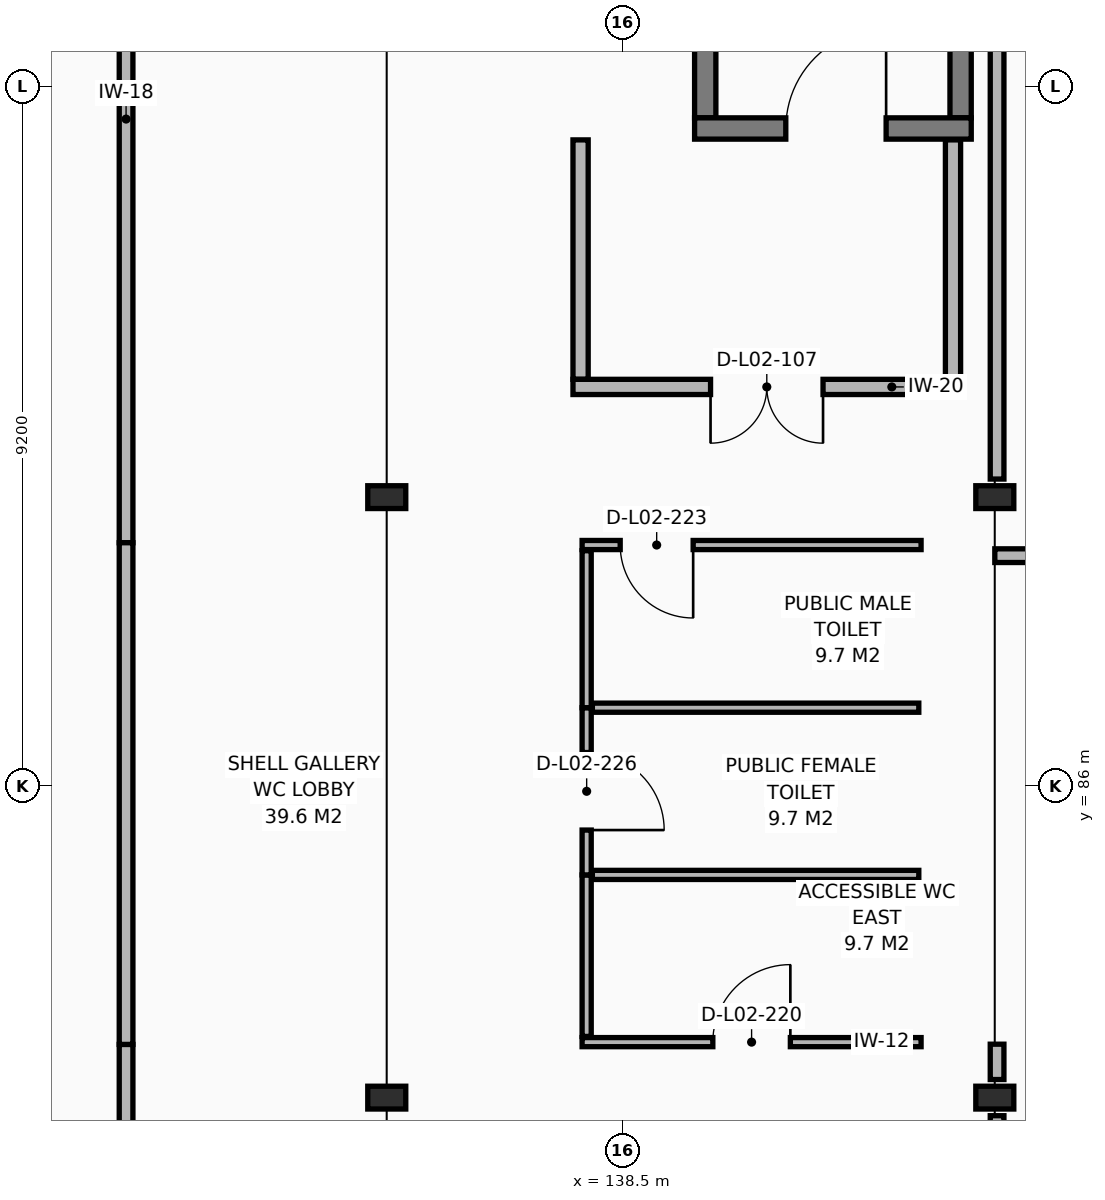
"""IFC4 building model, lengths in metres.
Left out: names, types, materials, properties, quantities, classifications, styles, units other than length and angle.
Written with IfcOpenShell. Run it as: python <this file> out.ifc"""

import sys

from ifc_helpers import new_model, si_unit, direction, frame, frame_2d, origin, origin_2d, place, context, subcontext, project, spatial, rectangle, i_section, extrude, element, fill, save


model = new_model("IFC4")
c1 = context("Model", 3, precision=1e-05, world=origin(), true_north=direction((0.0, 1.0)))
c2 = subcontext(c1, "Body", "Model", "MODEL_VIEW")
j1 = project(units=[si_unit("LENGTHUNIT", "METRE"), si_unit("PLANEANGLEUNIT", "RADIAN")], contexts=[c1])
p1 = place(None, origin())
s1 = spatial("IfcSite", under=j1, at=p1, CompositionType="ELEMENT")
p2 = place(p1, origin())
s2 = spatial("IfcBuilding", under=s1, at=p2, CompositionType="ELEMENT")
p3 = place(p2, frame((0.0, 0.0, 9.52)))
s3 = spatial("IfcBuildingStorey", under=s2, at=p3, CompositionType="ELEMENT", Elevation=9.52)
for number, where, z_axis, x_axis in (
    (1, (135.4, 81.9, 0.0), (0.0, 0.0, 1.0), (1.0, 0.0, 0.0)),
    (2, (135.4, 89.8, 0.0), (0.0, 0.0, 1.0), (1.0, 0.0, 0.0)),
):
    element("IfcColumn", number, at=place(p3, frame(where, z_axis=z_axis, x_axis=x_axis)), inside=s3, PredefinedType="COLUMN", context=c2, shape_type="SweptSolid", body=[
        extrude(i_section(OverallWidth=0.3, OverallDepth=0.5, WebThickness=0.014, FlangeThickness=0.028, FilletRadius=0.027, at=origin_2d()), origin(), (0.0, 0.0, 1.0), 7.65),
    ])
for number, where, z_axis, x_axis in (
    (3, (143.4, 81.9, 0.0), (0.0, 0.0, 1.0), (1.0, 0.0, 0.0)),
    (4, (143.4, 89.8, 0.0), (0.0, 0.0, 1.0), (1.0, 0.0, 0.0)),
):
    element("IfcColumn", number, at=place(p3, frame(where, z_axis=z_axis, x_axis=x_axis)), inside=s3, PredefinedType="COLUMN", context=c2, shape_type="SweptSolid", body=[
        extrude(i_section(OverallWidth=0.3, OverallDepth=0.5, WebThickness=0.014, FlangeThickness=0.028, FilletRadius=0.027, at=origin_2d()), origin(), (0.0, 0.0, 1.0), 9.05),
    ])
for number, where, z_axis, x_axis in (
    (5, (142.95, 94.79, 0.0), (0.0, 0.0, 1.0), (0.0, 1.0, 0.0)),
    (6, (139.59, 102.49, 0.0), (0.0, 0.0, 1.0), (0.0, -1.0, 0.0)),
):
    element("IfcWall", number, at=place(p3, frame(where, z_axis=z_axis, x_axis=x_axis)), inside=s3, PredefinedType="SHEAR", context=c2, shape_type="SweptSolid", body=[
        extrude(rectangle(XDim=7.7, YDim=0.28, at=frame_2d((3.85, 0.0))), origin(), (0.0, 0.0, 1.0), 4.0),
    ])
p4 = place(p3, frame((139.45, 94.65, 0.0), z_axis=(0.0, 0.0, 1.0), x_axis=(1.0, 0.0, 0.0)))
e7 = element("IfcWall", 7, at=p4, inside=s3, PredefinedType="SHEAR", context=c2, shape_type="SweptSolid", body=[
    extrude(rectangle(XDim=3.64, YDim=0.28, at=frame_2d((1.82, 0.0))), origin(), (0.0, 0.0, 1.0), 4.0),
])
p5 = place(p4, frame((1.2, 0.0, 0.0)))
e8 = element("IfcOpeningElement", 8, at=p5, cuts=e7, PredefinedType="OPENING", context=c2, shape_type="SweptSolid", body=[
    extrude(rectangle(XDim=1.32, YDim=2.12, at=frame_2d((0.66, 1.06))), frame((0.0, 0.15, 0.0), z_axis=(0.0, -1.0, 0.0), x_axis=(1.0, 0.0, 0.0)), (0.0, 0.0, 1.0), 0.3),
])
for number, where, z_axis, x_axis in (
    (9, (142.85, 91.35, 0.0), (0.0, 0.0, 1.0), (0.0, 1.0, 0.0)),
    (10, (137.95, 94.5, 0.0), (0.0, 0.0, 1.0), (0.0, -1.0, 0.0)),
):
    element("IfcWall", number, at=place(p3, frame(where, z_axis=z_axis, x_axis=x_axis)), inside=s3, PredefinedType="PARTITIONING", context=c2, shape_type="SweptSolid", body=[
        extrude(rectangle(XDim=3.15, YDim=0.2, at=frame_2d((1.575, 0.0))), origin(), (0.0, 0.0, 1.0), 4.0),
    ])
p6 = place(p3, frame((142.95, 91.25, 0.0), z_axis=(0.0, 0.0, 1.0), x_axis=(-1.0, 0.0, 0.0)))
e11 = element("IfcWall", 11, at=p6, inside=s3, PredefinedType="PARTITIONING", context=c2, shape_type="SweptSolid", body=[
    extrude(rectangle(XDim=5.1, YDim=0.2, at=frame_2d((2.55, 0.0))), origin(), (0.0, 0.0, 1.0), 4.0),
])
p7 = place(p6, frame((1.81, 0.0, 0.0)))
e12 = element("IfcOpeningElement", 12, at=p7, cuts=e11, PredefinedType="OPENING", context=c2, shape_type="SweptSolid", body=[
    extrude(rectangle(XDim=1.48, YDim=2.15, at=frame_2d((0.74, 1.075))), frame((0.0, 0.11, 0.0), z_axis=(0.0, -1.0, 0.0), x_axis=(1.0, 0.0, 0.0)), (0.0, 0.0, 1.0), 0.22),
])
p8 = place(p3, frame((137.97, 82.63, 0.0), z_axis=(0.0, 0.0, 1.0), x_axis=(1.0, 0.0, 0.0)))
e13 = element("IfcWall", 13, at=p8, inside=s3, PredefinedType="PARTITIONING", context=c2, shape_type="SweptSolid", body=[
    extrude(rectangle(XDim=4.46, YDim=0.12, at=frame_2d((2.23, 0.0))), origin(), (0.0, 0.0, 1.0), 3.99),
])
p9 = place(p8, frame((1.72, 0.0, 0.0)))
e14 = element("IfcOpeningElement", 14, at=p9, cuts=e13, PredefinedType="OPENING", context=c2, shape_type="SweptSolid", body=[
    extrude(rectangle(XDim=1.02, YDim=2.12, at=frame_2d((0.51, 1.06))), frame((0.0, 0.07, 0.0), z_axis=(0.0, -1.0, 0.0), x_axis=(1.0, 0.0, 0.0)), (0.0, 0.0, 1.0), 0.14),
])
p10 = place(p3, frame((131.97, 78.17, 0.0), z_axis=(0.0, 0.0, 1.0), x_axis=(0.0, 1.0, 0.0)))
e15 = element("IfcWall", 15, at=p10, inside=s3, PredefinedType="PARTITIONING", context=c2, shape_type="SweptSolid", body=[
    extrude(rectangle(XDim=4.43, YDim=0.18, at=frame_2d((2.215, 0.0))), origin(), (0.0, 0.0, 1.0), 3.99),
])
p11 = place(p10, frame((1.505, 0.0, 0.0)))
e16 = element("IfcOpeningElement", 16, at=p11, cuts=e15, PredefinedType="OPENING", context=c2, shape_type="SweptSolid", body=[
    extrude(rectangle(XDim=1.42, YDim=2.18, at=frame_2d((0.71, 1.09))), frame((0.0, 0.1, 0.0), z_axis=(0.0, -1.0, 0.0), x_axis=(1.0, 0.0, 0.0)), (0.0, 0.0, 1.0), 0.2),
])
p12 = place(p3, frame((143.43, 81.662, 0.0), z_axis=(0.0, 0.0, 1.0), x_axis=(0.0, -1.0, 0.0)))
e17 = element("IfcWall", 17, at=p12, inside=s3, PredefinedType="PARTITIONING", context=c2, shape_type="SweptSolid", body=[
    extrude(rectangle(XDim=3.862, YDim=0.18, at=frame_2d((1.931, 0.0))), origin(), (0.0, 0.0, 1.0), 3.99),
])
p13 = place(p12, frame((1.111, 0.0, 0.0)))
e18 = element("IfcOpeningElement", 18, at=p13, cuts=e17, PredefinedType="OPENING", context=c2, shape_type="SweptSolid", body=[
    extrude(rectangle(XDim=1.64, YDim=2.2, at=frame_2d((0.82, 1.1))), frame((0.0, 0.1, 0.0), z_axis=(0.0, -1.0, 0.0), x_axis=(1.0, 0.0, 0.0)), (0.0, 0.0, 1.0), 0.2),
])
p14 = place(p3, frame((143.43, 82.603, 0.0), z_axis=(0.0, 0.0, 1.0), x_axis=(0.0, -1.0, 0.0)))
e19 = element("IfcWall", 19, at=p14, inside=s3, PredefinedType="PARTITIONING", context=c2, shape_type="SweptSolid", body=[
    extrude(rectangle(XDim=0.465, YDim=0.18, at=frame_2d((0.232, 0.0))), origin(), (0.0, 0.0, 1.0), 3.99),
])
p15 = place(p3, frame((142.43, 89.17, 0.0), z_axis=(0.0, 0.0, 1.0), x_axis=(-1.0, 0.0, 0.0)))
e20 = element("IfcWall", 20, at=p15, inside=s3, PredefinedType="PARTITIONING", context=c2, shape_type="SweptSolid", body=[
    extrude(rectangle(XDim=4.46, YDim=0.12, at=frame_2d((2.23, 0.0))), origin(), (0.0, 0.0, 1.0), 3.99),
])
p16 = place(p15, frame((2.999, 0.0, 0.0)))
e21 = element("IfcOpeningElement", 21, at=p16, cuts=e20, PredefinedType="OPENING", context=c2, shape_type="SweptSolid", body=[
    extrude(rectangle(XDim=0.96, YDim=2.1, at=frame_2d((0.48, 1.05))), frame((0.0, 0.07, 0.0), z_axis=(0.0, -1.0, 0.0), x_axis=(1.0, 0.0, 0.0)), (0.0, 0.0, 1.0), 0.14),
])
p17 = place(p3, frame((131.97, 89.2, 0.0), z_axis=(0.0, 0.0, 1.0), x_axis=(0.0, 1.0, 0.0)))
e22 = element("IfcWall", 22, at=p17, inside=s3, PredefinedType="PARTITIONING", context=c2, shape_type="SweptSolid", body=[
    extrude(rectangle(XDim=23.936, YDim=0.18, at=frame_2d((11.968, 0.0))), origin(), (0.0, 0.0, 1.0), 3.99),
])
p18 = place(p17, frame((11.148, 0.0, 0.0)))
e23 = element("IfcOpeningElement", 23, at=p18, cuts=e22, PredefinedType="OPENING", context=c2, shape_type="SweptSolid", body=[
    extrude(rectangle(XDim=1.64, YDim=2.2, at=frame_2d((0.82, 1.1))), frame((0.0, 0.1, 0.0), z_axis=(0.0, -1.0, 0.0), x_axis=(1.0, 0.0, 0.0)), (0.0, 0.0, 1.0), 0.2),
])
p19 = place(p3, frame((143.43, 97.462, 0.0), z_axis=(0.0, 0.0, 1.0), x_axis=(0.0, -1.0, 0.0)))
e24 = element("IfcWall", 24, at=p19, inside=s3, PredefinedType="PARTITIONING", context=c2, shape_type="SweptSolid", body=[
    extrude(rectangle(XDim=7.424, YDim=0.18, at=frame_2d((3.712, 0.0))), origin(), (0.0, 0.0, 1.0), 3.99),
])
p20 = place(p3, frame((138.03, 84.83, 0.0), z_axis=(0.0, 0.0, 1.0), x_axis=(0.0, -1.0, 0.0)))
e25 = element("IfcWall", 25, at=p20, inside=s3, PredefinedType="PARTITIONING", context=c2, shape_type="SweptSolid", body=[
    extrude(rectangle(XDim=2.125, YDim=0.12, at=frame_2d((1.062, 0.0))), origin(), (0.0, 0.0, 1.0), 3.99),
])
p21 = place(p3, frame((138.03, 87.03, 0.0), z_axis=(0.0, 0.0, 1.0), x_axis=(0.0, -1.0, 0.0)))
e26 = element("IfcWall", 26, at=p21, inside=s3, PredefinedType="PARTITIONING", context=c2, shape_type="SweptSolid", body=[
    extrude(rectangle(XDim=2.2, YDim=0.12, at=frame_2d((1.1, 0.0))), origin(), (0.0, 0.0, 1.0), 3.99),
])
p22 = place(p21, frame((0.59, 0.0, 0.0)))
e27 = element("IfcOpeningElement", 27, at=p22, cuts=e26, PredefinedType="OPENING", context=c2, shape_type="SweptSolid", body=[
    extrude(rectangle(XDim=1.02, YDim=2.12, at=frame_2d((0.51, 1.06))), frame((0.0, 0.07, 0.0), z_axis=(0.0, -1.0, 0.0), x_axis=(1.0, 0.0, 0.0)), (0.0, 0.0, 1.0), 0.14),
])
p23 = place(p3, frame((138.03, 89.095, 0.0), z_axis=(0.0, 0.0, 1.0), x_axis=(0.0, -1.0, 0.0)))
e28 = element("IfcWall", 28, at=p23, inside=s3, PredefinedType="PARTITIONING", context=c2, shape_type="SweptSolid", body=[
    extrude(rectangle(XDim=2.065, YDim=0.12, at=frame_2d((1.032, 0.0))), origin(), (0.0, 0.0, 1.0), 3.99),
])
p24 = place(p3, frame((131.97, 82.6, 0.0), z_axis=(0.0, 0.0, 1.0), x_axis=(0.0, 1.0, 0.0)))
e29 = element("IfcWall", 29, at=p24, inside=s3, PredefinedType="PARTITIONING", context=c2, shape_type="SweptSolid", body=[
    extrude(rectangle(XDim=6.6, YDim=0.18, at=frame_2d((3.3, 0.0))), origin(), (0.0, 0.0, 1.0), 3.99),
])
for number, where, z_axis, x_axis in (
    (30, (138.105, 84.83, 0.0), (0.0, 0.0, 1.0), (1.0, 0.0, 0.0)),
    (31, (138.105, 87.03, 0.0), (0.0, 0.0, 1.0), (1.0, 0.0, 0.0)),
):
    element("IfcWall", number, at=place(p3, frame(where, z_axis=z_axis, x_axis=x_axis)), inside=s3, PredefinedType="PARTITIONING", context=c2, shape_type="SweptSolid", body=[
        extrude(rectangle(XDim=4.295, YDim=0.12, at=frame_2d((2.147, 0.0))), origin(), (0.0, 0.0, 1.0), 3.99),
    ])
p25 = place(p3, frame((143.4, 89.03, 0.0), z_axis=(0.0, 0.0, 1.0), x_axis=(1.0, 0.0, 0.0)))
e32 = element("IfcWall", 32, at=p25, inside=s3, PredefinedType="PARTITIONING", context=c2, shape_type="SweptSolid", body=[
    extrude(rectangle(XDim=20.636, YDim=0.18, at=frame_2d((10.318, 0.0))), origin(), (0.0, 0.0, 1.0), 3.99),
])
p26 = place(p5, origin())
e33 = element("IfcDoor", 33, at=p26, inside=s3, OperationType="SINGLE_SWING_RIGHT", PredefinedType="DOOR", context=c2, shape_type="SweptSolid", body=[
    extrude(rectangle(XDim=1.32, YDim=2.12, at=frame_2d((0.66, 1.06))), frame((0.0, 0.025, 0.0), z_axis=(0.0, -1.0, 0.0), x_axis=(1.0, 0.0, 0.0)), (0.0, 0.0, 1.0), 0.05),
])
fill(e8, e33)
p27 = place(p7, origin())
e34 = element("IfcDoor", 34, at=p27, inside=s3, OperationType="DOUBLE_DOOR_SINGLE_SWING", PredefinedType="DOOR", context=c2, shape_type="SweptSolid", body=[
    extrude(rectangle(XDim=1.48, YDim=2.15, at=frame_2d((0.74, 1.075))), frame((0.0, 0.025, 0.0), z_axis=(0.0, -1.0, 0.0), x_axis=(1.0, 0.0, 0.0)), (0.0, 0.0, 1.0), 0.05),
])
fill(e12, e34)
p28 = place(p9, origin())
e35 = element("IfcDoor", 35, at=p28, inside=s3, OperationType="SINGLE_SWING_RIGHT", PredefinedType="DOOR", context=c2, shape_type="SweptSolid", body=[
    extrude(rectangle(XDim=1.02, YDim=2.12, at=frame_2d((0.51, 1.06))), frame((0.0, 0.025, 0.0), z_axis=(0.0, -1.0, 0.0), x_axis=(1.0, 0.0, 0.0)), (0.0, 0.0, 1.0), 0.05),
])
fill(e14, e35)
p29 = place(p16, origin())
e36 = element("IfcDoor", 36, at=p29, inside=s3, OperationType="SINGLE_SWING_LEFT", PredefinedType="DOOR", context=c2, shape_type="SweptSolid", body=[
    extrude(rectangle(XDim=0.96, YDim=2.1, at=frame_2d((0.48, 1.05))), frame((0.0, 0.025, 0.0), z_axis=(0.0, -1.0, 0.0), x_axis=(1.0, 0.0, 0.0)), (0.0, 0.0, 1.0), 0.05),
])
fill(e21, e36)
p30 = place(p22, origin())
e37 = element("IfcDoor", 37, at=p30, inside=s3, OperationType="SINGLE_SWING_RIGHT", PredefinedType="DOOR", context=c2, shape_type="SweptSolid", body=[
    extrude(rectangle(XDim=1.02, YDim=2.12, at=frame_2d((0.51, 1.06))), frame((0.0, 0.025, 0.0), z_axis=(0.0, -1.0, 0.0), x_axis=(1.0, 0.0, 0.0)), (0.0, 0.0, 1.0), 0.05),
])
fill(e27, e37)
save(model, sys.argv[1])
